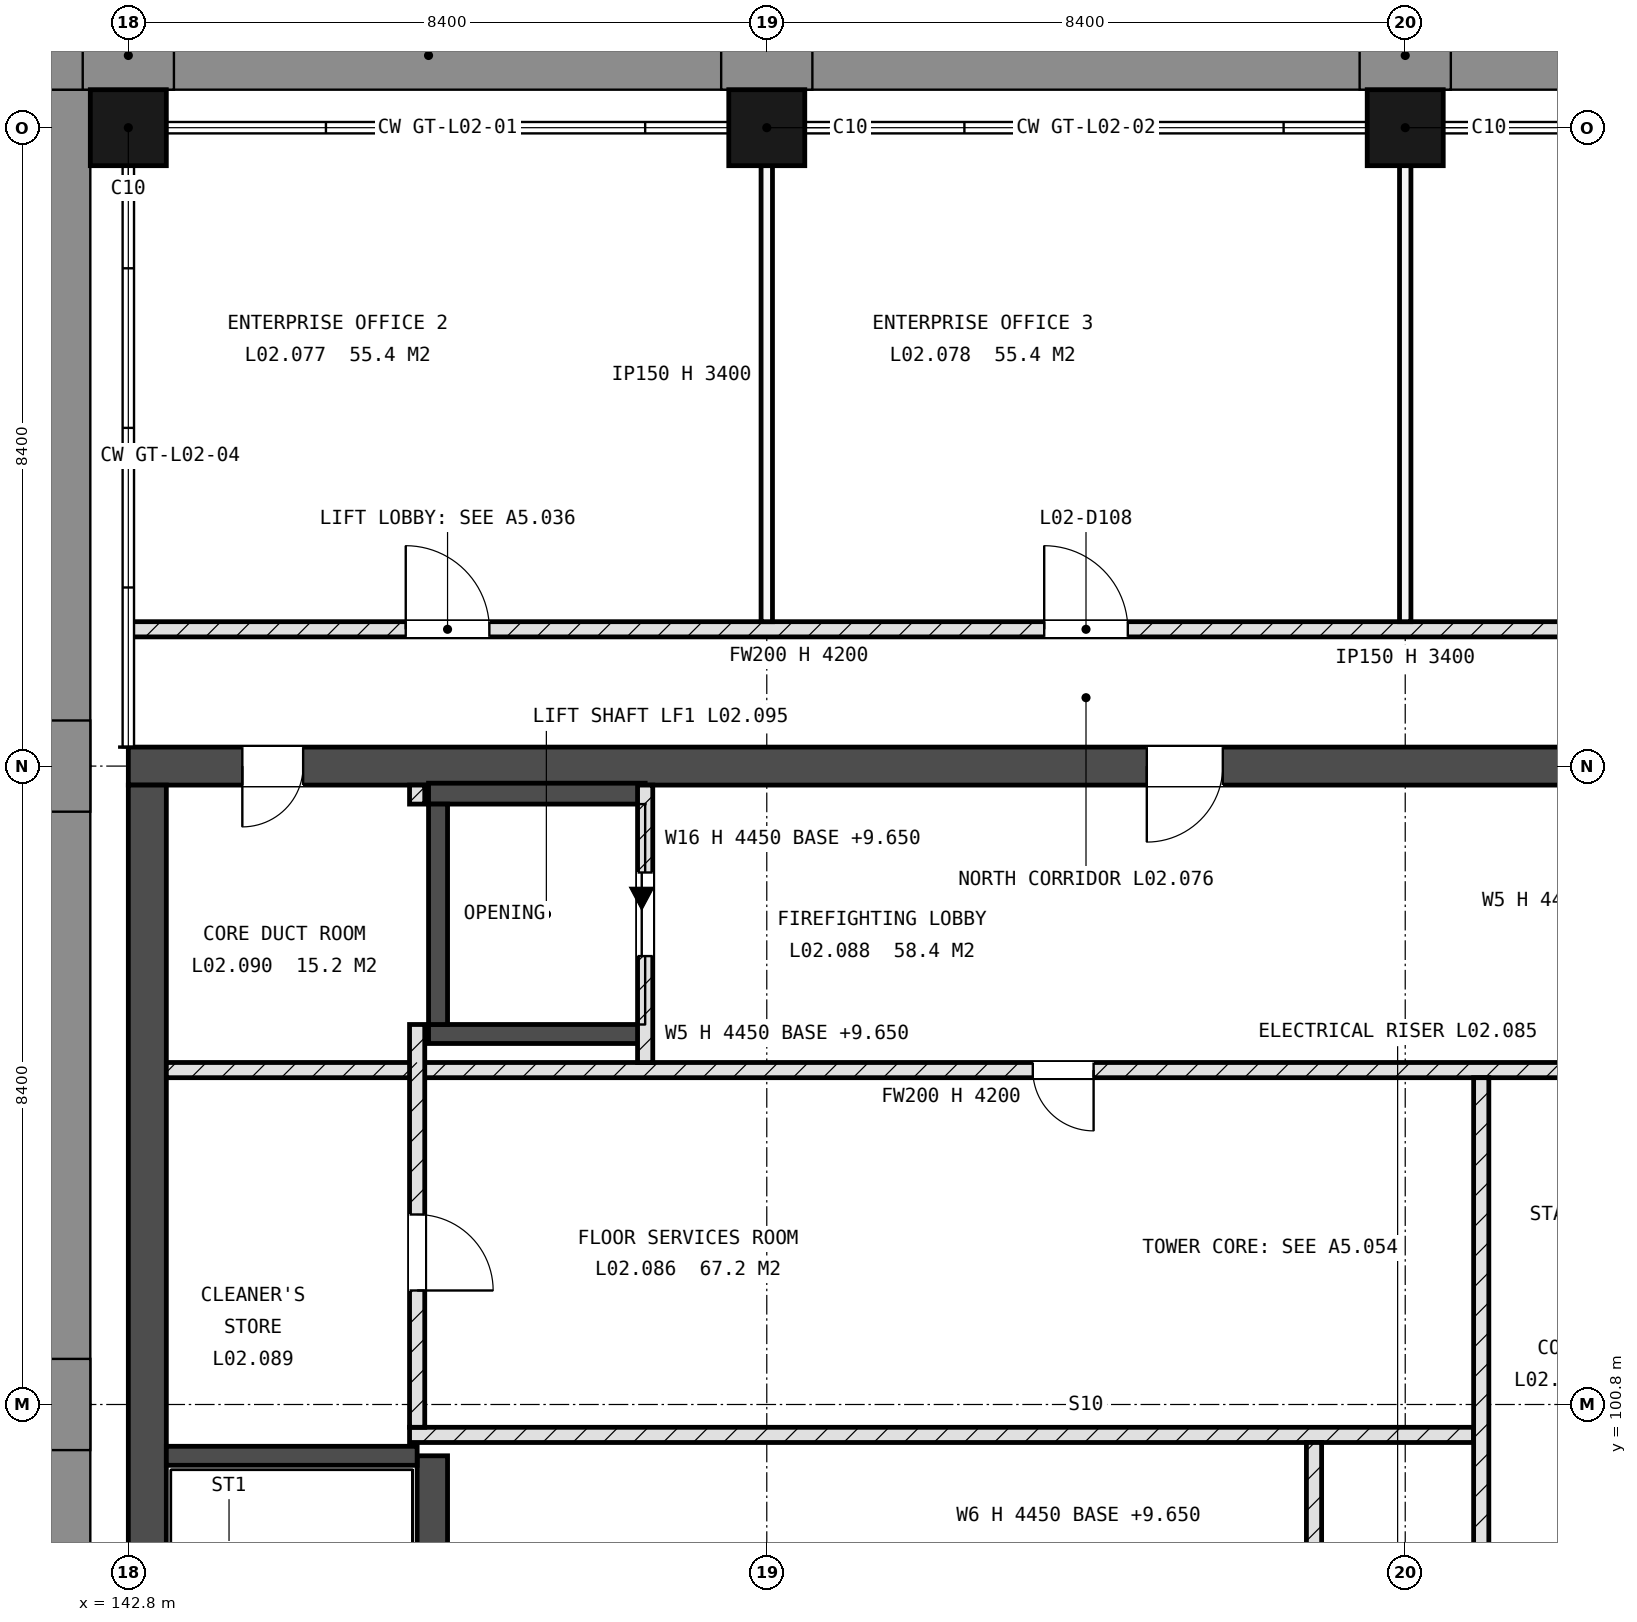
"""IFC4 building model, lengths in metres.
Left out: names, types, materials, properties, quantities, classifications, styles, units other than length and angle.
Written with IfcOpenShell. Run it as: python <this file> out.ifc"""

import sys

from ifc_helpers import new_model, si_unit, direction, frame, frame_2d, origin, origin_2d, place, context, subcontext, project, spatial, rectangle, extrude, element, fill, save


model = new_model("IFC4")
c1 = context("Model", 3, precision=1e-05, world=origin(), true_north=direction((0.0, 1.0)))
c2 = subcontext(c1, "Body", "Model", "MODEL_VIEW")
j1 = project(units=[si_unit("LENGTHUNIT", "METRE"), si_unit("PLANEANGLEUNIT", "RADIAN")], contexts=[c1])
p1 = place(None, origin())
s1 = spatial("IfcSite", under=j1, at=p1, CompositionType="ELEMENT")
p2 = place(p1, origin())
s2 = spatial("IfcBuilding", under=s1, at=p2, CompositionType="ELEMENT")
p3 = place(p2, frame((0.0, 0.0, 9.9)))
s3 = spatial("IfcBuildingStorey", under=s2, at=p3, CompositionType="ELEMENT", Elevation=9.9)
for number, where, z_axis, x_axis in (
    (1, (142.8, 117.6, -0.25), (0.0, 0.0, 1.0), (1.0, 0.0, 0.0)),
    (2, (151.2, 117.6, -0.25), (0.0, 0.0, 1.0), (1.0, 0.0, 0.0)),
    (3, (159.6, 117.6, -0.25), (0.0, 0.0, 1.0), (1.0, 0.0, 0.0)),
):
    element("IfcColumn", number, at=place(p3, frame(where, z_axis=z_axis, x_axis=x_axis)), inside=s3, PredefinedType="COLUMN", context=c2, shape_type="SweptSolid", body=[
        extrude(rectangle(XDim=1.0, YDim=1.0, at=origin_2d()), origin(), (0.0, 0.0, 1.0), 4.45),
    ])
p4 = place(p3, frame((142.8, 109.2, -0.25), z_axis=(0.0, 0.0, 1.0), x_axis=(1.0, 0.0, 0.0)))
e4 = element("IfcWall", 4, at=p4, inside=s3, PredefinedType="SHEAR", context=c2, shape_type="SweptSolid", body=[
    extrude(rectangle(XDim=25.2, YDim=0.5, at=frame_2d((12.6, 0.0))), origin(), (0.0, 0.0, 1.0), 4.45),
])
p5 = place(p4, frame((22.8, 0.0, 0.25)))
e5 = element("IfcOpeningElement", 5, at=p5, cuts=e4, PredefinedType="OPENING", context=c2, shape_type="SweptSolid", body=[
    extrude(rectangle(XDim=1.0, YDim=2.1, at=frame_2d((0.5, 1.05))), frame((0.0, 0.26, 0.0), z_axis=(0.0, -1.0, 0.0), x_axis=(1.0, 0.0, 0.0)), (0.0, 0.0, 1.0), 0.52),
])
p6 = place(p4, frame((1.5, 0.0, 0.25)))
e6 = element("IfcOpeningElement", 6, at=p6, cuts=e4, PredefinedType="OPENING", context=c2, shape_type="SweptSolid", body=[
    extrude(rectangle(XDim=0.8, YDim=2.1, at=frame_2d((0.4, 1.05))), frame((0.0, 0.26, 0.0), z_axis=(0.0, -1.0, 0.0), x_axis=(1.0, 0.0, 0.0)), (0.0, 0.0, 1.0), 0.52),
])
p7 = place(p4, frame((13.4, 0.0, 0.25)))
e7 = element("IfcOpeningElement", 7, at=p7, cuts=e4, PredefinedType="OPENING", context=c2, shape_type="SweptSolid", body=[
    extrude(rectangle(XDim=1.0, YDim=2.1, at=frame_2d((0.5, 1.05))), frame((0.0, 0.26, 0.0), z_axis=(0.0, -1.0, 0.0), x_axis=(1.0, 0.0, 0.0)), (0.0, 0.0, 1.0), 0.52),
])
p8 = place(p3, frame((143.05, 92.65, -0.25), z_axis=(0.0, 0.0, 1.0), x_axis=(0.0, 1.0, 0.0)))
e8 = element("IfcWall", 8, at=p8, inside=s3, PredefinedType="SHEAR", context=c2, shape_type="SweptSolid", body=[
    extrude(rectangle(XDim=16.3, YDim=0.5, at=frame_2d((8.15, 0.0))), origin(), (0.0, 0.0, 1.0), 4.45),
])
p9 = place(p8, frame((2.95, 0.0, 1.85)))
e9 = element("IfcOpeningElement", 9, at=p9, cuts=e8, PredefinedType="OPENING", context=c2, shape_type="SweptSolid", body=[
    extrude(rectangle(XDim=1.2, YDim=0.9, at=frame_2d((0.6, 0.45))), frame((0.0, 0.26, 0.0), z_axis=(0.0, -1.0, 0.0), x_axis=(1.0, 0.0, 0.0)), (0.0, 0.0, 1.0), 0.52),
])
p10 = place(p3, frame((146.8, 92.65, -0.25), z_axis=(0.0, 0.0, 1.0), x_axis=(0.0, 1.0, 0.0)))
e10 = element("IfcWall", 10, at=p10, inside=s3, PredefinedType="SHEAR", context=c2, shape_type="SweptSolid", body=[
    extrude(rectangle(XDim=7.475, YDim=0.4, at=frame_2d((3.738, 0.0))), origin(), (0.0, 0.0, 1.0), 4.45),
])
p11 = place(p10, frame((0.1, 0.0, 0.25)))
e11 = element("IfcOpeningElement", 11, at=p11, cuts=e10, PredefinedType="OPENING", context=c2, shape_type="SweptSolid", body=[
    extrude(rectangle(XDim=1.0, YDim=2.1, at=frame_2d((0.5, 1.05))), frame((0.0, 0.21, 0.0), z_axis=(0.0, -1.0, 0.0), x_axis=(1.0, 0.0, 0.0)), (0.0, 0.0, 1.0), 0.42),
])
p12 = place(p3, frame((143.3, 100.125, -0.25), z_axis=(0.0, 0.0, 1.0), x_axis=(1.0, 0.0, 0.0)))
e12 = element("IfcWall", 12, at=p12, inside=s3, PredefinedType="SHEAR", context=c2, shape_type="SweptSolid", body=[
    extrude(rectangle(XDim=3.3, YDim=0.25, at=frame_2d((1.65, 0.0))), origin(), (0.0, 0.0, 1.0), 4.45),
])
p13 = place(p3, frame((146.75, 105.675, -0.25), z_axis=(0.0, 0.0, 1.0), x_axis=(1.0, 0.0, 0.0)))
e13 = element("IfcWall", 13, at=p13, inside=s3, PredefinedType="SHEAR", context=c2, shape_type="SweptSolid", body=[
    extrude(rectangle(XDim=2.85, YDim=0.25, at=frame_2d((1.425, 0.0))), origin(), (0.0, 0.0, 1.0), 4.45),
])
p14 = place(p3, frame((146.75, 108.837, -0.25), z_axis=(0.0, 0.0, 1.0), x_axis=(1.0, 0.0, 0.0)))
e14 = element("IfcWall", 14, at=p14, inside=s3, PredefinedType="SHEAR", context=c2, shape_type="SweptSolid", body=[
    extrude(rectangle(XDim=2.85, YDim=0.275, at=frame_2d((1.425, 0.0))), origin(), (0.0, 0.0, 1.0), 4.45),
])
p15 = place(p3, frame((146.875, 105.8, -0.25), z_axis=(0.0, 0.0, 1.0), x_axis=(0.0, 1.0, 0.0)))
e15 = element("IfcWall", 15, at=p15, inside=s3, PredefinedType="SHEAR", context=c2, shape_type="SweptSolid", body=[
    extrude(rectangle(XDim=2.9, YDim=0.25, at=frame_2d((1.45, 0.0))), origin(), (0.0, 0.0, 1.0), 4.45),
])
p16 = place(p3, frame((146.5, 100.4, 0.0), z_axis=(0.0, 0.0, 1.0), x_axis=(1.0, 0.0, 0.0)))
e16 = element("IfcWall", 16, at=p16, inside=s3, PredefinedType="SOLIDWALL", context=c2, shape_type="SweptSolid", body=[
    extrude(rectangle(XDim=14.0, YDim=0.2, at=frame_2d((7.0, 0.0))), origin(), (0.0, 0.0, 1.0), 4.2),
])
p17 = place(p3, frame((143.3, 105.2, 0.0), z_axis=(0.0, 0.0, 1.0), x_axis=(1.0, 0.0, 0.0)))
e17 = element("IfcWall", 17, at=p17, inside=s3, PredefinedType="SOLIDWALL", context=c2, shape_type="SweptSolid", body=[
    extrude(rectangle(XDim=20.65, YDim=0.2, at=frame_2d((10.325, 0.0))), origin(), (0.0, 0.0, 1.0), 4.2),
])
p18 = place(p17, frame((11.4, 0.0, 0.0)))
e18 = element("IfcOpeningElement", 18, at=p18, cuts=e17, PredefinedType="OPENING", context=c2, shape_type="SweptSolid", body=[
    extrude(rectangle(XDim=0.8, YDim=2.1, at=frame_2d((0.4, 1.05))), frame((0.0, 0.11, 0.0), z_axis=(0.0, -1.0, 0.0), x_axis=(1.0, 0.0, 0.0)), (0.0, 0.0, 1.0), 0.22),
])
p19 = place(p17, frame((18.7, 0.0, 0.0)))
e19 = element("IfcOpeningElement", 19, at=p19, cuts=e17, PredefinedType="OPENING", context=c2, shape_type="SweptSolid", body=[
    extrude(rectangle(XDim=1.0, YDim=2.1, at=frame_2d((0.5, 1.05))), frame((0.0, 0.11, 0.0), z_axis=(0.0, -1.0, 0.0), x_axis=(1.0, 0.0, 0.0)), (0.0, 0.0, 1.0), 0.22),
])
p20 = place(p3, frame((142.8, 111.0, 0.0), z_axis=(0.0, 0.0, 1.0), x_axis=(1.0, 0.0, 0.0)))
e20 = element("IfcWall", 20, at=p20, inside=s3, PredefinedType="SOLIDWALL", context=c2, shape_type="SweptSolid", body=[
    extrude(rectangle(XDim=25.2, YDim=0.2, at=frame_2d((12.6, 0.0))), origin(), (0.0, 0.0, 1.0), 4.2),
])
p21 = place(p20, frame((3.65, 0.0, 0.0)))
e21 = element("IfcOpeningElement", 21, at=p21, cuts=e20, PredefinedType="OPENING", context=c2, shape_type="SweptSolid", body=[
    extrude(rectangle(XDim=1.1, YDim=2.25, at=frame_2d((0.55, 1.125))), frame((0.0, 0.11, 0.0), z_axis=(0.0, -1.0, 0.0), x_axis=(1.0, 0.0, 0.0)), (0.0, 0.0, 1.0), 0.22),
])
p22 = place(p20, frame((12.05, 0.0, 0.0)))
e22 = element("IfcOpeningElement", 22, at=p22, cuts=e20, PredefinedType="OPENING", context=c2, shape_type="SweptSolid", body=[
    extrude(rectangle(XDim=1.1, YDim=2.25, at=frame_2d((0.55, 1.125))), frame((0.0, 0.11, 0.0), z_axis=(0.0, -1.0, 0.0), x_axis=(1.0, 0.0, 0.0)), (0.0, 0.0, 1.0), 0.22),
])
p23 = place(p20, frame((20.45, 0.0, 0.0)))
e23 = element("IfcOpeningElement", 23, at=p23, cuts=e20, PredefinedType="OPENING", context=c2, shape_type="SweptSolid", body=[
    extrude(rectangle(XDim=1.1, YDim=2.25, at=frame_2d((0.55, 1.125))), frame((0.0, 0.11, 0.0), z_axis=(0.0, -1.0, 0.0), x_axis=(1.0, 0.0, 0.0)), (0.0, 0.0, 1.0), 0.22),
])
p24 = place(p3, frame((146.6, 100.5, 0.0), z_axis=(0.0, 0.0, 1.0), x_axis=(0.0, 1.0, 0.0)))
e24 = element("IfcWall", 24, at=p24, inside=s3, PredefinedType="SOLIDWALL", context=c2, shape_type="SweptSolid", body=[
    extrude(rectangle(XDim=5.3, YDim=0.2, at=frame_2d((2.65, 0.0))), origin(), (0.0, 0.0, 1.0), 4.2),
])
p25 = place(p24, frame((1.8, 0.0, 0.0)))
e25 = element("IfcOpeningElement", 25, at=p25, cuts=e24, PredefinedType="OPENING", context=c2, shape_type="SweptSolid", body=[
    extrude(rectangle(XDim=1.0, YDim=2.1, at=frame_2d((0.5, 1.05))), frame((0.0, 0.11, 0.0), z_axis=(0.0, -1.0, 0.0), x_axis=(1.0, 0.0, 0.0)), (0.0, 0.0, 1.0), 0.22),
])
p26 = place(p3, frame((146.6, 108.7, 0.0), z_axis=(0.0, 0.0, 1.0), x_axis=(0.0, 1.0, 0.0)))
e26 = element("IfcWall", 26, at=p26, inside=s3, PredefinedType="SOLIDWALL", context=c2, shape_type="SweptSolid", body=[
    extrude(rectangle(XDim=0.25, YDim=0.2, at=frame_2d((0.125, 0.0))), origin(), (0.0, 0.0, 1.0), 4.2),
])
p27 = place(p3, frame((149.6, 105.3, 0.0), z_axis=(0.0, 0.0, 1.0), x_axis=(0.0, 1.0, 0.0)))
e27 = element("IfcWall", 27, at=p27, inside=s3, PredefinedType="SOLIDWALL", context=c2, shape_type="SweptSolid", body=[
    extrude(rectangle(XDim=3.65, YDim=0.2, at=frame_2d((1.825, 0.0))), origin(), (0.0, 0.0, 1.0), 4.2),
])
p28 = place(p27, frame((1.4, 0.0, 0.0)))
e28 = element("IfcOpeningElement", 28, at=p28, cuts=e27, PredefinedType="OPENING", context=c2, shape_type="SweptSolid", body=[
    extrude(rectangle(XDim=1.1, YDim=2.1, at=frame_2d((0.55, 1.05))), frame((0.0, 0.11, 0.0), z_axis=(0.0, -1.0, 0.0), x_axis=(1.0, 0.0, 0.0)), (0.0, 0.0, 1.0), 0.22),
])
p29 = place(p3, frame((151.2, 111.1, 0.0), z_axis=(0.0, 0.0, 1.0), x_axis=(0.0, 1.0, 0.0)))
e29 = element("IfcWall", 29, at=p29, inside=s3, PredefinedType="PARTITIONING", context=c2, shape_type="SweptSolid", body=[
    extrude(rectangle(XDim=6.5, YDim=0.15, at=frame_2d((3.25, 0.0))), origin(), (0.0, 0.0, 1.0), 3.4),
])
p30 = place(p3, frame((158.4, 98.7, 0.0), z_axis=(0.0, 0.0, 1.0), x_axis=(0.0, 1.0, 0.0)))
e30 = element("IfcWall", 30, at=p30, inside=s3, PredefinedType="SOLIDWALL", context=c2, shape_type="SweptSolid", body=[
    extrude(rectangle(XDim=1.6, YDim=0.2, at=frame_2d((0.8, 0.0))), origin(), (0.0, 0.0, 1.0), 4.2),
])
p31 = place(p3, frame((159.6, 111.1, 0.0), z_axis=(0.0, 0.0, 1.0), x_axis=(0.0, 1.0, 0.0)))
e31 = element("IfcWall", 31, at=p31, inside=s3, PredefinedType="PARTITIONING", context=c2, shape_type="SweptSolid", body=[
    extrude(rectangle(XDim=6.5, YDim=0.15, at=frame_2d((3.25, 0.0))), origin(), (0.0, 0.0, 1.0), 3.4),
])
p32 = place(p3, frame((160.6, 92.65, 0.0), z_axis=(0.0, 0.0, 1.0), x_axis=(0.0, 1.0, 0.0)))
e32 = element("IfcWall", 32, at=p32, inside=s3, PredefinedType="SOLIDWALL", context=c2, shape_type="SweptSolid", body=[
    extrude(rectangle(XDim=12.45, YDim=0.2, at=frame_2d((6.225, 0.0))), origin(), (0.0, 0.0, 1.0), 4.2),
])
p33 = place(p32, frame((5.05, 0.0, 0.0)))
e33 = element("IfcOpeningElement", 33, at=p33, cuts=e32, PredefinedType="OPENING", context=c2, shape_type="SweptSolid", body=[
    extrude(rectangle(XDim=0.8, YDim=2.1, at=frame_2d((0.4, 1.05))), frame((0.0, 0.11, 0.0), z_axis=(0.0, -1.0, 0.0), x_axis=(1.0, 0.0, 0.0)), (0.0, 0.0, 1.0), 0.22),
])
p34 = place(p32, frame((0.75, 0.0, 0.0)))
e34 = element("IfcOpeningElement", 34, at=p34, cuts=e32, PredefinedType="OPENING", context=c2, shape_type="SweptSolid", body=[
    extrude(rectangle(XDim=1.0, YDim=2.1, at=frame_2d((0.5, 1.05))), frame((0.0, 0.11, 0.0), z_axis=(0.0, -1.0, 0.0), x_axis=(1.0, 0.0, 0.0)), (0.0, 0.0, 1.0), 0.22),
])
p35 = place(p28, origin())
e35 = element("IfcDoor", 35, at=p35, inside=s3, OperationType="SLIDING_TO_LEFT", PredefinedType="DOOR", context=c2, shape_type="SweptSolid", body=[
    extrude(rectangle(XDim=1.1, YDim=2.1, at=frame_2d((0.55, 1.05))), frame((0.0, 0.025, 0.0), z_axis=(0.0, -1.0, 0.0), x_axis=(1.0, 0.0, 0.0)), (0.0, 0.0, 1.0), 0.05),
])
fill(e28, e35)
p36 = place(p21, origin())
e36 = element("IfcDoor", 36, at=p36, inside=s3, OperationType="SINGLE_SWING_RIGHT", PredefinedType="DOOR", context=c2, shape_type="SweptSolid", body=[
    extrude(rectangle(XDim=1.1, YDim=2.25, at=frame_2d((0.55, 1.125))), frame((0.0, 0.025, 0.0), z_axis=(0.0, -1.0, 0.0), x_axis=(1.0, 0.0, 0.0)), (0.0, 0.0, 1.0), 0.05),
])
fill(e21, e36)
p37 = place(p22, origin())
e37 = element("IfcDoor", 37, at=p37, inside=s3, OperationType="SINGLE_SWING_RIGHT", PredefinedType="DOOR", context=c2, shape_type="SweptSolid", body=[
    extrude(rectangle(XDim=1.1, YDim=2.25, at=frame_2d((0.55, 1.125))), frame((0.0, 0.025, 0.0), z_axis=(0.0, -1.0, 0.0), x_axis=(1.0, 0.0, 0.0)), (0.0, 0.0, 1.0), 0.05),
])
fill(e22, e37)
p38 = place(p18, origin())
e38 = element("IfcDoor", 38, at=p38, inside=s3, OperationType="SINGLE_SWING_RIGHT", PredefinedType="DOOR", context=c2, shape_type="SweptSolid", body=[
    extrude(rectangle(XDim=0.8, YDim=2.1, at=frame_2d((0.4, 1.05))), frame((0.0, 0.025, 0.0), z_axis=(0.0, -1.0, 0.0), x_axis=(1.0, 0.0, 0.0)), (0.0, 0.0, 1.0), 0.05),
])
fill(e18, e38)
p39 = place(p25, origin())
e39 = element("IfcDoor", 39, at=p39, inside=s3, OperationType="SINGLE_SWING_LEFT", PredefinedType="DOOR", context=c2, shape_type="SweptSolid", body=[
    extrude(rectangle(XDim=1.0, YDim=2.1, at=frame_2d((0.5, 1.05))), frame((0.0, 0.025, 0.0), z_axis=(0.0, -1.0, 0.0), x_axis=(1.0, 0.0, 0.0)), (0.0, 0.0, 1.0), 0.05),
])
fill(e25, e39)
p40 = place(p6, origin())
e40 = element("IfcDoor", 40, at=p40, inside=s3, OperationType="SINGLE_SWING_LEFT", PredefinedType="DOOR", context=c2, shape_type="SweptSolid", body=[
    extrude(rectangle(XDim=0.8, YDim=2.1, at=frame_2d((0.4, 1.05))), frame((0.0, 0.025, 0.0), z_axis=(0.0, -1.0, 0.0), x_axis=(1.0, 0.0, 0.0)), (0.0, 0.0, 1.0), 0.05),
])
fill(e6, e40)
p41 = place(p7, origin())
e41 = element("IfcDoor", 41, at=p41, inside=s3, OperationType="SINGLE_SWING_LEFT", PredefinedType="DOOR", context=c2, shape_type="SweptSolid", body=[
    extrude(rectangle(XDim=1.0, YDim=2.1, at=frame_2d((0.5, 1.05))), frame((0.0, 0.025, 0.0), z_axis=(0.0, -1.0, 0.0), x_axis=(1.0, 0.0, 0.0)), (0.0, 0.0, 1.0), 0.05),
])
fill(e7, e41)
save(model, sys.argv[1])
